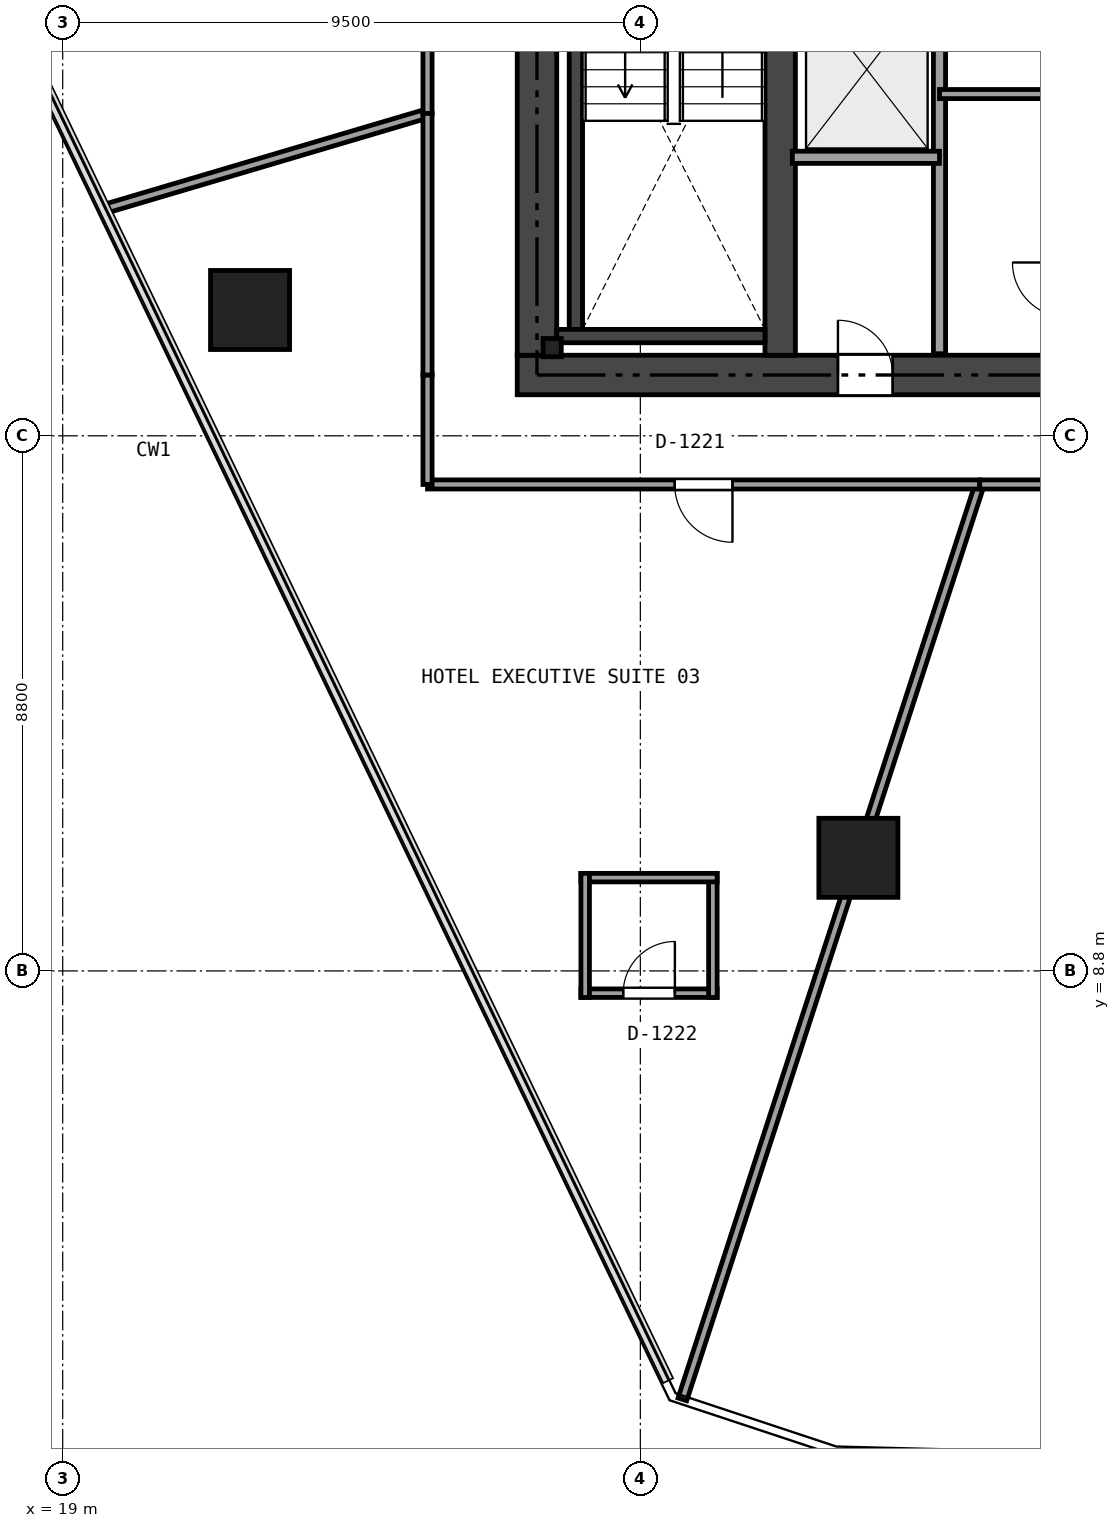
"""IFC4 building model, lengths in metres.
Left out: names, types, materials, properties, quantities, classifications, styles, units other than length and angle.
Written with IfcOpenShell. Run it as: python <this file> out.ifc"""

import sys

from ifc_helpers import new_model, si_unit, direction, frame, frame_2d, origin, origin_2d, place, context, subcontext, project, spatial, rectangle, i_section, extrude, element, fill, save


model = new_model("IFC4")
c1 = context("Model", 3, precision=1e-05, world=origin(), true_north=direction((0.0, 1.0)))
c2 = subcontext(c1, "Body", "Model", "MODEL_VIEW")
j1 = project(units=[si_unit("LENGTHUNIT", "METRE"), si_unit("PLANEANGLEUNIT", "RADIAN")], contexts=[c1])
p1 = place(None, origin())
s1 = spatial("IfcSite", under=j1, at=p1, CompositionType="ELEMENT")
p2 = place(p1, origin())
s2 = spatial("IfcBuilding", under=s1, at=p2, CompositionType="ELEMENT")
p3 = place(p2, frame((0.0, 0.0, 51.15)))
s3 = spatial("IfcBuildingStorey", under=s2, at=p3, CompositionType="ELEMENT", Elevation=51.15)
p4 = place(p3, frame((26.475, 18.6, 0.0), z_axis=(0.0, 0.0, 1.0), x_axis=(1.0, 0.0, 0.0)))
e1 = element("IfcWall", 1, at=p4, inside=s3, PredefinedType="SHEAR", context=c2, shape_type="SweptSolid", body=[
    extrude(rectangle(XDim=21.45, YDim=0.65, at=frame_2d((10.725, 0.0))), origin(), (0.0, 0.0, 1.0), 3.17),
])
p5 = place(p4, frame((12.45, 0.0, 0.0)))
e2 = element("IfcOpeningElement", 2, at=p5, cuts=e1, PredefinedType="OPENING", context=c2, shape_type="SweptSolid", body=[
    extrude(rectangle(XDim=1.15, YDim=2.15, at=frame_2d((0.575, 1.075))), frame((0.0, 0.335, 0.0), z_axis=(0.0, -1.0, 0.0), x_axis=(1.0, 0.0, 0.0)), (0.0, 0.0, 1.0), 0.67),
])
p6 = place(p4, frame((5.275, 0.0, 0.0)))
e3 = element("IfcOpeningElement", 3, at=p6, cuts=e1, PredefinedType="OPENING", context=c2, shape_type="SweptSolid", body=[
    extrude(rectangle(XDim=0.9, YDim=2.1, at=frame_2d((0.45, 1.05))), frame((0.0, 0.335, 0.0), z_axis=(0.0, -1.0, 0.0), x_axis=(1.0, 0.0, 0.0)), (0.0, 0.0, 1.0), 0.67),
])
p7 = place(p3, frame((26.8, 18.925, 0.0), z_axis=(0.0, 0.0, 1.0), x_axis=(0.0, 1.0, 0.0)))
e4 = element("IfcWall", 4, at=p7, inside=s3, PredefinedType="SHEAR", context=c2, shape_type="SweptSolid", body=[
    extrude(rectangle(XDim=14.95, YDim=0.65, at=frame_2d((7.475, 0.0))), origin(), (0.0, 0.0, 1.0), 3.17),
])
p8 = place(p3, frame((30.8, 18.925, 0.0), z_axis=(0.0, 0.0, 1.0), x_axis=(0.0, 1.0, 0.0)))
e5 = element("IfcWall", 5, at=p8, inside=s3, PredefinedType="SHEAR", context=c2, shape_type="SweptSolid", body=[
    extrude(rectangle(XDim=14.95, YDim=0.5, at=frame_2d((7.475, 0.0))), origin(), (0.0, 0.0, 1.0), 3.17),
])
p9 = place(p8, frame((6.575, 0.0, 0.0)))
e6 = element("IfcOpeningElement", 6, at=p9, cuts=e5, PredefinedType="OPENING", context=c2, shape_type="SweptSolid", body=[
    extrude(rectangle(XDim=1.1, YDim=2.15, at=frame_2d((0.55, 1.075))), frame((0.0, 0.26, 0.0), z_axis=(0.0, -1.0, 0.0), x_axis=(1.0, 0.0, 0.0)), (0.0, 0.0, 1.0), 0.52),
])
p10 = place(p8, frame((8.375, 0.0, 0.0)))
e7 = element("IfcOpeningElement", 7, at=p10, cuts=e5, PredefinedType="OPENING", context=c2, shape_type="SweptSolid", body=[
    extrude(rectangle(XDim=0.9, YDim=2.1, at=frame_2d((0.45, 1.05))), frame((0.0, 0.26, 0.0), z_axis=(0.0, -1.0, 0.0), x_axis=(1.0, 0.0, 0.0)), (0.0, 0.0, 1.0), 0.52),
])
p11 = place(p3, frame((27.44, 19.35, 0.0), z_axis=(0.0, 0.0, 1.0), x_axis=(0.0, 1.0, 0.0)))
e8 = element("IfcWall", 8, at=p11, inside=s3, PredefinedType="SHEAR", context=c2, shape_type="SweptSolid", body=[
    extrude(rectangle(XDim=7.4, YDim=0.22, at=frame_2d((3.7, 0.0))), origin(), (0.0, 0.0, 1.0), 3.17),
])
p12 = place(p3, frame((27.125, 19.24, 0.0), z_axis=(0.0, 0.0, 1.0), x_axis=(1.0, 0.0, 0.0)))
e9 = element("IfcWall", 9, at=p12, inside=s3, PredefinedType="SHEAR", context=c2, shape_type="SweptSolid", body=[
    extrude(rectangle(XDim=3.425, YDim=0.22, at=frame_2d((1.712, 0.0))), origin(), (0.0, 0.0, 1.0), 3.17),
])
for number, where, z_axis, x_axis in (
    (10, (22.081, 19.669, 0.0), (0.0, 0.0, 1.0), (1.0, 0.0, 0.0)),
    (11, (32.086, 10.66, 0.0), (0.0, 0.0, 1.0), (1.0, 0.0, 0.0)),
):
    element("IfcColumn", number, at=place(p3, frame(where, z_axis=z_axis, x_axis=x_axis)), inside=s3, PredefinedType="COLUMN", context=c2, shape_type="SweptSolid", body=[
        extrude(rectangle(XDim=1.3, YDim=1.3, at=origin_2d()), origin(), (0.0, 0.0, 1.0), 3.17),
    ])
p13 = place(p3, frame((27.05, 19.05, 0.0), z_axis=(0.0, 0.0, 1.0), x_axis=(1.0, 0.0, 0.0)))
e12 = element("IfcColumn", 12, at=p13, inside=s3, PredefinedType="PILASTER", context=c2, shape_type="SweptSolid", body=[
    extrude(i_section(OverallWidth=0.3, OverallDepth=0.3, WebThickness=0.011, FlangeThickness=0.019, at=origin_2d()), origin(), (0.0, 0.0, 1.0), 3.17),
])
p14 = place(p3, frame((33.42, 18.95, 0.0), z_axis=(0.0, 0.0, 1.0), x_axis=(0.0, 1.0, 0.0)))
e13 = element("IfcWall", 13, at=p14, inside=s3, PredefinedType="SOLIDWALL", context=c2, shape_type="SweptSolid", body=[
    extrude(rectangle(XDim=6.13, YDim=0.2, at=frame_2d((3.065, 0.0))), origin(), (0.0, 0.0, 1.0), 2.691),
])
p15 = place(p3, frame((31.0, 22.18, 0.0), z_axis=(0.0, 0.0, 1.0), x_axis=(1.0, 0.0, 0.0)))
e14 = element("IfcWall", 14, at=p15, inside=s3, PredefinedType="SOLIDWALL", context=c2, shape_type="SweptSolid", body=[
    extrude(rectangle(XDim=2.42, YDim=0.2, at=frame_2d((1.21, 0.0))), origin(), (0.0, 0.0, 1.0), 3.17),
])
p16 = place(p3, frame((33.42, 23.22, 0.0), z_axis=(0.0, 0.0, 1.0), x_axis=(1.0, 0.0, 0.0)))
e15 = element("IfcWall", 15, at=p16, inside=s3, PredefinedType="PARTITIONING", context=c2, shape_type="SweptSolid", body=[
    extrude(rectangle(XDim=2.0, YDim=0.15, at=frame_2d((1.0, 0.0))), origin(), (0.0, 0.0, 1.0), 3.17),
])
p17 = place(p3, frame((27.523, 8.434, 0.0), z_axis=(0.0, 0.0, 1.0), x_axis=(1.0, 0.0, 0.0)))
e16 = element("IfcWall", 16, at=p17, inside=s3, PredefinedType="PARTITIONING", context=c2, shape_type="SweptSolid", body=[
    extrude(rectangle(XDim=2.24, YDim=0.14, at=frame_2d((1.12, 0.0))), origin(), (0.0, 0.0, 1.0), 3.17),
])
p18 = place(p17, frame((0.695, 0.0, 0.0)))
e17 = element("IfcOpeningElement", 17, at=p18, cuts=e16, PredefinedType="OPENING", context=c2, shape_type="SweptSolid", body=[
    extrude(rectangle(XDim=0.85, YDim=2.1, at=frame_2d((0.425, 1.05))), frame((0.0, 0.08, 0.0), z_axis=(0.0, -1.0, 0.0), x_axis=(1.0, 0.0, 0.0)), (0.0, 0.0, 1.0), 0.16),
])
p19 = place(p3, frame((29.693, 8.364, 0.0), z_axis=(0.0, 0.0, 1.0), x_axis=(0.0, 1.0, 0.0)))
e18 = element("IfcWall", 18, at=p19, inside=s3, PredefinedType="PARTITIONING", context=c2, shape_type="SweptSolid", body=[
    extrude(rectangle(XDim=2.04, YDim=0.14, at=frame_2d((1.02, 0.0))), origin(), (0.0, 0.0, 1.0), 3.17),
])
p20 = place(p3, frame((29.763, 10.334, 0.0), z_axis=(0.0, 0.0, 1.0), x_axis=(-1.0, 0.0, 0.0)))
e19 = element("IfcWall", 19, at=p20, inside=s3, PredefinedType="PARTITIONING", context=c2, shape_type="SweptSolid", body=[
    extrude(rectangle(XDim=2.24, YDim=0.14, at=frame_2d((1.12, 0.0))), origin(), (0.0, 0.0, 1.0), 3.17),
])
p21 = place(p3, frame((27.593, 10.404, 0.0), z_axis=(0.0, 0.0, 1.0), x_axis=(0.0, -1.0, 0.0)))
e20 = element("IfcWall", 20, at=p21, inside=s3, PredefinedType="PARTITIONING", context=c2, shape_type="SweptSolid", body=[
    extrude(rectangle(XDim=2.04, YDim=0.14, at=frame_2d((1.02, 0.0))), origin(), (0.0, 0.0, 1.0), 3.17),
])
p22 = place(p3, frame((19.652, 21.32, 0.0), z_axis=(0.0, 0.0, 1.0), x_axis=(0.958921677743, 0.283670964244, 0.0)))
e21 = element("IfcWall", 21, at=p22, inside=s3, PredefinedType="PARTITIONING", context=c2, shape_type="SweptSolid", body=[
    extrude(rectangle(XDim=5.577, YDim=0.15, at=frame_2d((2.789, 0.0))), origin(), (0.0, 0.0, 1.0), 2.355),
])
p23 = place(p3, frame((25.0, 22.902, 0.0), z_axis=(0.0, 0.0, 1.0), x_axis=(0.0, 1.0, 0.0)))
e22 = element("IfcWall", 22, at=p23, inside=s3, PredefinedType="PARTITIONING", context=c2, shape_type="SweptSolid", body=[
    extrude(rectangle(XDim=13.098, YDim=0.15, at=frame_2d((6.549, 0.0))), origin(), (0.0, 0.0, 1.0), 2.355),
])
p24 = place(p23, frame((6.074, 0.0, 0.0)))
e23 = element("IfcOpeningElement", 23, at=p24, cuts=e22, PredefinedType="OPENING", context=c2, shape_type="SweptSolid", body=[
    extrude(rectangle(XDim=0.95, YDim=2.15, at=frame_2d((0.475, 1.075))), frame((0.0, 0.085, 0.0), z_axis=(0.0, -1.0, 0.0), x_axis=(1.0, 0.0, 0.0)), (0.0, 0.0, 1.0), 0.17),
])
p25 = place(p3, frame((29.191, 1.754, 0.0), z_axis=(0.0, 0.0, 1.0), x_axis=(0.309094097783, 0.951031460424, 0.0)))
e24 = element("IfcWall", 24, at=p25, inside=s3, PredefinedType="PARTITIONING", context=c2, shape_type="SweptSolid", body=[
    extrude(rectangle(XDim=15.821, YDim=0.15, at=frame_2d((7.91, 0.0))), origin(), (0.0, 0.0, 1.0), 2.395),
])
p26 = place(p3, frame((34.081, 16.8, 0.0), z_axis=(0.0, 0.0, 1.0), x_axis=(-1.0, 0.0, 0.0)))
e25 = element("IfcWall", 25, at=p26, inside=s3, PredefinedType="PARTITIONING", context=c2, shape_type="SweptSolid", body=[
    extrude(rectangle(XDim=9.081, YDim=0.15, at=frame_2d((4.541, 0.0))), origin(), (0.0, 0.0, 1.0), 2.355),
])
p27 = place(p26, frame((4.066, 0.0, 0.0)))
e26 = element("IfcOpeningElement", 26, at=p27, cuts=e25, PredefinedType="OPENING", context=c2, shape_type="SweptSolid", body=[
    extrude(rectangle(XDim=0.95, YDim=2.15, at=frame_2d((0.475, 1.075))), frame((0.0, 0.085, 0.0), z_axis=(0.0, -1.0, 0.0), x_axis=(1.0, 0.0, 0.0)), (0.0, 0.0, 1.0), 0.17),
])
p28 = place(p3, frame((25.0, 16.8, 0.0), z_axis=(0.0, 0.0, 1.0), x_axis=(0.0, 1.0, 0.0)))
e27 = element("IfcWall", 27, at=p28, inside=s3, PredefinedType="PARTITIONING", context=c2, shape_type="SweptSolid", body=[
    extrude(rectangle(XDim=1.8, YDim=0.15, at=frame_2d((0.9, 0.0))), origin(), (0.0, 0.0, 1.0), 2.355),
])
p29 = place(p3, frame((25.0, 18.6, 0.0), z_axis=(0.0, 0.0, 1.0), x_axis=(0.0, 1.0, 0.0)))
e28 = element("IfcWall", 28, at=p29, inside=s3, PredefinedType="PARTITIONING", context=c2, shape_type="SweptSolid", body=[
    extrude(rectangle(XDim=4.302, YDim=0.15, at=frame_2d((2.151, 0.0))), origin(), (0.0, 0.0, 1.0), 2.395),
])
p30 = place(p3, frame((43.675, 16.8, 0.0), z_axis=(0.0, 0.0, 1.0), x_axis=(-1.0, 0.0, 0.0)))
e29 = element("IfcWall", 29, at=p30, inside=s3, PredefinedType="PARTITIONING", context=c2, shape_type="SweptSolid", body=[
    extrude(rectangle(XDim=9.594, YDim=0.15, at=frame_2d((4.797, 0.0))), origin(), (0.0, 0.0, 1.0), 2.395),
])
p31 = place(p30, frame((4.322, 0.0, 0.0)))
e30 = element("IfcOpeningElement", 30, at=p31, cuts=e29, PredefinedType="OPENING", context=c2, shape_type="SweptSolid", body=[
    extrude(rectangle(XDim=0.95, YDim=2.15, at=frame_2d((0.475, 1.075))), frame((0.0, 0.085, 0.0), z_axis=(0.0, -1.0, 0.0), x_axis=(1.0, 0.0, 0.0)), (0.0, 0.0, 1.0), 0.17),
])
p32 = place(p6, origin())
e31 = element("IfcDoor", 31, at=p32, inside=s3, OperationType="SINGLE_SWING_LEFT", PredefinedType="DOOR", context=c2, shape_type="SweptSolid", body=[
    extrude(rectangle(XDim=0.9, YDim=2.1, at=frame_2d((0.45, 1.05))), frame((0.0, 0.025, 0.0), z_axis=(0.0, -1.0, 0.0), x_axis=(1.0, 0.0, 0.0)), (0.0, 0.0, 1.0), 0.05),
])
fill(e3, e31)
p33 = place(p27, origin())
e32 = element("IfcDoor", 32, at=p33, inside=s3, OperationType="SINGLE_SWING_LEFT", PredefinedType="DOOR", context=c2, shape_type="SweptSolid", body=[
    extrude(rectangle(XDim=0.95, YDim=2.15, at=frame_2d((0.475, 1.075))), frame((0.0, 0.025, 0.0), z_axis=(0.0, -1.0, 0.0), x_axis=(1.0, 0.0, 0.0)), (0.0, 0.0, 1.0), 0.05),
])
fill(e26, e32)
p34 = place(p18, origin())
e33 = element("IfcDoor", 33, at=p34, inside=s3, OperationType="SINGLE_SWING_RIGHT", PredefinedType="DOOR", context=c2, shape_type="SweptSolid", body=[
    extrude(rectangle(XDim=0.85, YDim=2.1, at=frame_2d((0.425, 1.05))), frame((0.0, 0.025, 0.0), z_axis=(0.0, -1.0, 0.0), x_axis=(1.0, 0.0, 0.0)), (0.0, 0.0, 1.0), 0.05),
])
fill(e17, e33)
save(model, sys.argv[1])
